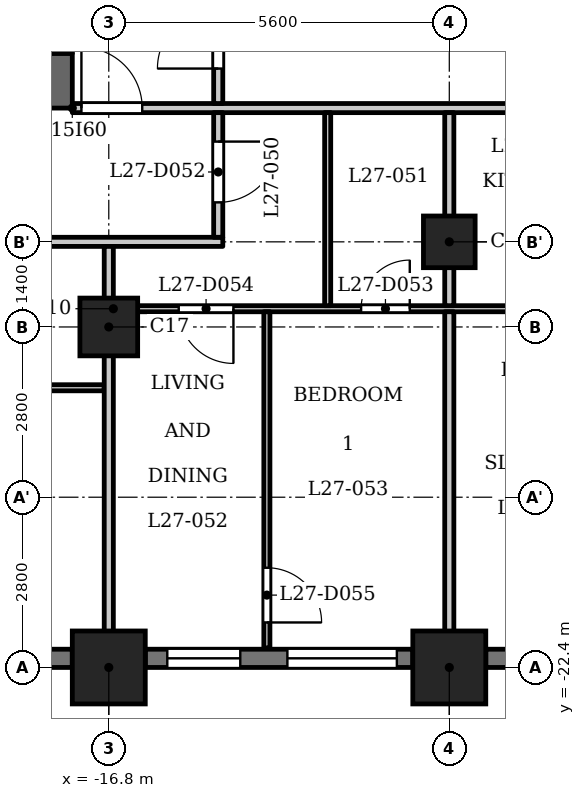
"""IFC4 building model, lengths in metres.
Left out: names, types, materials, properties, quantities, classifications, styles, units other than length and angle.
Written with IfcOpenShell. Run it as: python <this file> out.ifc"""

import sys

from ifc_helpers import new_model, si_unit, direction, frame, frame_2d, origin, origin_2d, place, context, subcontext, project, spatial, rectangle, extrude, element, fill, save


model = new_model("IFC4")
c1 = context("Model", 3, precision=1e-05, world=origin(), true_north=direction((0.0, 1.0)))
c2 = subcontext(c1, "Body", "Model", "MODEL_VIEW")
j1 = project(units=[si_unit("LENGTHUNIT", "METRE"), si_unit("PLANEANGLEUNIT", "RADIAN")], contexts=[c1])
p1 = place(None, origin())
s1 = spatial("IfcSite", under=j1, at=p1, CompositionType="ELEMENT")
p2 = place(p1, origin())
s2 = spatial("IfcBuilding", under=s1, at=p2, CompositionType="ELEMENT")
p3 = place(p2, frame((0.0, 0.0, 107.8)))
s3 = spatial("IfcBuildingStorey", under=s2, at=p3, CompositionType="ELEMENT", Elevation=107.8)
for number, where, z_axis, x_axis in (
    (1, (-16.8, -22.4, 0.0), (0.0, 0.0, 1.0), (1.0, 0.0, 0.0)),
    (2, (-11.2, -22.4, 0.0), (0.0, 0.0, 1.0), (1.0, 0.0, 0.0)),
):
    element("IfcColumn", number, at=place(p3, frame(where, z_axis=z_axis, x_axis=x_axis)), inside=s3, PredefinedType="COLUMN", context=c2, shape_type="SweptSolid", body=[
        extrude(rectangle(XDim=1.2, YDim=1.2, at=origin_2d()), origin(), (0.0, 0.0, 1.0), 3.5),
    ])
p4 = place(p3, frame((-16.8, -16.8, 0.0), z_axis=(0.0, 0.0, 1.0), x_axis=(1.0, 0.0, 0.0)))
e3 = element("IfcColumn", 3, at=p4, inside=s3, PredefinedType="COLUMN", context=c2, shape_type="SweptSolid", body=[
    extrude(rectangle(XDim=0.95, YDim=0.95, at=origin_2d()), origin(), (0.0, 0.0, 1.0), 3.5),
])
p5 = place(p3, frame((-11.2, -15.4, 0.0), z_axis=(0.0, 0.0, 1.0), x_axis=(1.0, 0.0, 0.0)))
e4 = element("IfcColumn", 4, at=p5, inside=s3, PredefinedType="COLUMN", context=c2, shape_type="SweptSolid", body=[
    extrude(rectangle(XDim=0.85, YDim=0.85, at=origin_2d()), origin(), (0.0, 0.0, 1.0), 3.5),
])
p6 = place(p3, frame((-20.0, -22.25, 0.0), z_axis=(0.0, 0.0, 1.0), x_axis=(1.0, 0.0, 0.0)))
e5 = element("IfcWall", 5, at=p6, inside=s3, PredefinedType="SOLIDWALL", context=c2, shape_type="SweptSolid", body=[
    extrude(rectangle(XDim=2.6, YDim=0.3, at=frame_2d((1.3, 0.0))), origin(), (0.0, 0.0, 1.0), 2.4),
])
p7 = place(p6, frame((0.7, 0.0, 0.6)))
e6 = element("IfcOpeningElement", 6, at=p7, cuts=e5, PredefinedType="OPENING", context=c2, shape_type="SweptSolid", body=[
    extrude(rectangle(XDim=1.2, YDim=1.55, at=frame_2d((0.6, 0.775))), frame((0.0, 0.16, 0.0), z_axis=(0.0, -1.0, 0.0), x_axis=(1.0, 0.0, 0.0)), (0.0, 0.0, 1.0), 0.32),
])
p8 = place(p3, frame((-16.2, -22.25, 0.0), z_axis=(0.0, 0.0, 1.0), x_axis=(1.0, 0.0, 0.0)))
e7 = element("IfcWall", 7, at=p8, inside=s3, PredefinedType="SOLIDWALL", context=c2, shape_type="SweptSolid", body=[
    extrude(rectangle(XDim=4.4, YDim=0.3, at=frame_2d((2.2, 0.0))), origin(), (0.0, 0.0, 1.0), 2.4),
])
p9 = place(p8, frame((0.363, 0.0, 0.6)))
e8 = element("IfcOpeningElement", 8, at=p9, cuts=e7, PredefinedType="OPENING", context=c2, shape_type="SweptSolid", body=[
    extrude(rectangle(XDim=1.2, YDim=1.55, at=frame_2d((0.6, 0.775))), frame((0.0, 0.16, 0.0), z_axis=(0.0, -1.0, 0.0), x_axis=(1.0, 0.0, 0.0)), (0.0, 0.0, 1.0), 0.32),
])
p10 = place(p8, frame((2.337, 0.0, 0.9)))
e9 = element("IfcOpeningElement", 9, at=p10, cuts=e7, PredefinedType="OPENING", context=c2, shape_type="SweptSolid", body=[
    extrude(rectangle(XDim=1.8, YDim=1.25, at=frame_2d((0.9, 0.625))), frame((0.0, 0.16, 0.0), z_axis=(0.0, -1.0, 0.0), x_axis=(1.0, 0.0, 0.0)), (0.0, 0.0, 1.0), 0.32),
])
p11 = place(p3, frame((-10.6, -22.25, 0.0), z_axis=(0.0, 0.0, 1.0), x_axis=(1.0, 0.0, 0.0)))
e10 = element("IfcWall", 10, at=p11, inside=s3, PredefinedType="SOLIDWALL", context=c2, shape_type="SweptSolid", body=[
    extrude(rectangle(XDim=4.4, YDim=0.3, at=frame_2d((2.2, 0.0))), origin(), (0.0, 0.0, 1.0), 2.4),
])
p12 = place(p11, frame((0.4, 0.0, 1.2)))
e11 = element("IfcOpeningElement", 11, at=p12, cuts=e10, PredefinedType="OPENING", context=c2, shape_type="SweptSolid", body=[
    extrude(rectangle(XDim=3.6, YDim=0.95, at=frame_2d((1.8, 0.475))), frame((0.0, 0.16, 0.0), z_axis=(0.0, -1.0, 0.0), x_axis=(1.0, 0.0, 0.0)), (0.0, 0.0, 1.0), 0.32),
])
p13 = place(p3, frame((-17.4, -12.75, 0.0), z_axis=(0.0, 0.0, 1.0), x_axis=(-1.0, 0.0, 0.0)))
e12 = element("IfcWall", 12, at=p13, inside=s3, PredefinedType="SHEAR", context=c2, shape_type="SweptSolid", body=[
    extrude(rectangle(XDim=10.4, YDim=0.9, at=frame_2d((5.2, 0.0))), origin(), (0.0, 0.0, 1.0), 3.2),
])
p14 = place(p3, frame((-17.6, -12.3, 0.0), z_axis=(0.0, 0.0, 1.0), x_axis=(0.0, 1.0, 0.0)))
e13 = element("IfcWall", 13, at=p14, inside=s3, PredefinedType="SHEAR", context=c2, shape_type="SweptSolid", body=[
    extrude(rectangle(XDim=24.6, YDim=0.4, at=frame_2d((12.3, 0.0))), origin(), (0.0, 0.0, 1.0), 3.2),
])
p15 = place(p14, frame((6.0, 0.0, 0.0)))
e14 = element("IfcOpeningElement", 14, at=p15, cuts=e13, PredefinedType="OPENING", context=c2, shape_type="SweptSolid", body=[
    extrude(rectangle(XDim=1.1, YDim=2.1, at=frame_2d((0.55, 1.05))), frame((0.0, 0.21, 0.0), z_axis=(0.0, -1.0, 0.0), x_axis=(1.0, 0.0, 0.0)), (0.0, 0.0, 1.0), 0.42),
])
p16 = place(p14, frame((8.4, 0.0, 0.0)))
e15 = element("IfcOpeningElement", 15, at=p16, cuts=e13, PredefinedType="OPENING", context=c2, shape_type="SweptSolid", body=[
    extrude(rectangle(XDim=1.1, YDim=2.1, at=frame_2d((0.55, 1.05))), frame((0.0, 0.21, 0.0), z_axis=(0.0, -1.0, 0.0), x_axis=(1.0, 0.0, 0.0)), (0.0, 0.0, 1.0), 0.42),
])
p17 = place(p14, frame((10.8, 0.0, 0.0)))
e16 = element("IfcOpeningElement", 16, at=p17, cuts=e13, PredefinedType="OPENING", context=c2, shape_type="SweptSolid", body=[
    extrude(rectangle(XDim=1.1, YDim=2.1, at=frame_2d((0.55, 1.05))), frame((0.0, 0.21, 0.0), z_axis=(0.0, -1.0, 0.0), x_axis=(1.0, 0.0, 0.0)), (0.0, 0.0, 1.0), 0.42),
])
p18 = place(p14, frame((16.75, 0.0, 0.0)))
e17 = element("IfcOpeningElement", 17, at=p18, cuts=e13, PredefinedType="OPENING", context=c2, shape_type="SweptSolid", body=[
    extrude(rectangle(XDim=0.9, YDim=2.1, at=frame_2d((0.45, 1.05))), frame((0.0, 0.21, 0.0), z_axis=(0.0, -1.0, 0.0), x_axis=(1.0, 0.0, 0.0)), (0.0, 0.0, 1.0), 0.42),
])
p19 = place(p14, frame((22.8, 0.0, 0.0)))
e18 = element("IfcOpeningElement", 18, at=p19, cuts=e13, PredefinedType="OPENING", context=c2, shape_type="SweptSolid", body=[
    extrude(rectangle(XDim=1.1, YDim=2.1, at=frame_2d((0.55, 1.05))), frame((0.0, 0.21, 0.0), z_axis=(0.0, -1.0, 0.0), x_axis=(1.0, 0.0, 0.0)), (0.0, 0.0, 1.0), 0.42),
])
p20 = place(p14, frame((0.7, 0.0, 0.0)))
e19 = element("IfcOpeningElement", 19, at=p20, cuts=e13, PredefinedType="OPENING", context=c2, shape_type="SweptSolid", body=[
    extrude(rectangle(XDim=1.1, YDim=2.1, at=frame_2d((0.55, 1.05))), frame((0.0, 0.21, 0.0), z_axis=(0.0, -1.0, 0.0), x_axis=(1.0, 0.0, 0.0)), (0.0, 0.0, 1.0), 0.42),
])
p21 = place(p14, frame((12.775, 0.0, 0.0)))
e20 = element("IfcOpeningElement", 20, at=p21, cuts=e13, PredefinedType="OPENING", context=c2, shape_type="SweptSolid", body=[
    extrude(rectangle(XDim=1.8, YDim=2.1, at=frame_2d((0.9, 1.05))), frame((0.0, 0.21, 0.0), z_axis=(0.0, -1.0, 0.0), x_axis=(1.0, 0.0, 0.0)), (0.0, 0.0, 1.0), 0.42),
])
p22 = place(p3, frame((-26.394, -17.8, 0.0), z_axis=(0.0, 0.0, 1.0), x_axis=(1.0, 0.0, 0.0)))
e21 = element("IfcWall", 21, at=p22, inside=s3, PredefinedType="PARTITIONING", context=c2, shape_type="SweptSolid", body=[
    extrude(rectangle(XDim=9.519, YDim=0.1, at=frame_2d((4.76, 0.0))), origin(), (0.0, 0.0, 1.0), 3.2),
])
p23 = place(p22, frame((0.794, 0.0, 0.0)))
e22 = element("IfcOpeningElement", 22, at=p23, cuts=e21, PredefinedType="OPENING", context=c2, shape_type="SweptSolid", body=[
    extrude(rectangle(XDim=0.8, YDim=2.1, at=frame_2d((0.4, 1.05))), frame((0.0, 0.06, 0.0), z_axis=(0.0, -1.0, 0.0), x_axis=(1.0, 0.0, 0.0)), (0.0, 0.0, 1.0), 0.12),
])
p24 = place(p22, frame((5.644, 0.0, 0.0)))
e23 = element("IfcOpeningElement", 23, at=p24, cuts=e21, PredefinedType="OPENING", context=c2, shape_type="SweptSolid", body=[
    extrude(rectangle(XDim=0.9, YDim=2.1, at=frame_2d((0.45, 1.05))), frame((0.0, 0.06, 0.0), z_axis=(0.0, -1.0, 0.0), x_axis=(1.0, 0.0, 0.0)), (0.0, 0.0, 1.0), 0.12),
])
p25 = place(p3, frame((-16.725, -16.5, 0.0), z_axis=(0.0, 0.0, 1.0), x_axis=(1.0, 0.0, 0.0)))
e24 = element("IfcWall", 24, at=p25, inside=s3, PredefinedType="PARTITIONING", context=c2, shape_type="SweptSolid", body=[
    extrude(rectangle(XDim=33.45, YDim=0.1, at=frame_2d((16.725, 0.0))), origin(), (0.0, 0.0, 1.0), 3.2),
])
p26 = place(p25, frame((4.075, 0.0, 0.0)))
e25 = element("IfcOpeningElement", 25, at=p26, cuts=e24, PredefinedType="OPENING", context=c2, shape_type="SweptSolid", body=[
    extrude(rectangle(XDim=0.8, YDim=2.1, at=frame_2d((0.4, 1.05))), frame((0.0, 0.06, 0.0), z_axis=(0.0, -1.0, 0.0), x_axis=(1.0, 0.0, 0.0)), (0.0, 0.0, 1.0), 0.12),
])
p27 = place(p25, frame((1.075, 0.0, 0.0)))
e26 = element("IfcOpeningElement", 26, at=p27, cuts=e24, PredefinedType="OPENING", context=c2, shape_type="SweptSolid", body=[
    extrude(rectangle(XDim=0.9, YDim=2.1, at=frame_2d((0.45, 1.05))), frame((0.0, 0.06, 0.0), z_axis=(0.0, -1.0, 0.0), x_axis=(1.0, 0.0, 0.0)), (0.0, 0.0, 1.0), 0.12),
])
p28 = place(p25, frame((9.675, 0.0, 0.0)))
e27 = element("IfcOpeningElement", 27, at=p28, cuts=e24, PredefinedType="OPENING", context=c2, shape_type="SweptSolid", body=[
    extrude(rectangle(XDim=0.8, YDim=2.1, at=frame_2d((0.4, 1.05))), frame((0.0, 0.06, 0.0), z_axis=(0.0, -1.0, 0.0), x_axis=(1.0, 0.0, 0.0)), (0.0, 0.0, 1.0), 0.12),
])
p29 = place(p25, frame((7.675, 0.0, 0.0)))
e28 = element("IfcOpeningElement", 28, at=p29, cuts=e24, PredefinedType="OPENING", context=c2, shape_type="SweptSolid", body=[
    extrude(rectangle(XDim=0.9, YDim=2.1, at=frame_2d((0.45, 1.05))), frame((0.0, 0.06, 0.0), z_axis=(0.0, -1.0, 0.0), x_axis=(1.0, 0.0, 0.0)), (0.0, 0.0, 1.0), 0.12),
])
p30 = place(p25, frame((15.275, 0.0, 0.0)))
e29 = element("IfcOpeningElement", 29, at=p30, cuts=e24, PredefinedType="OPENING", context=c2, shape_type="SweptSolid", body=[
    extrude(rectangle(XDim=0.8, YDim=2.1, at=frame_2d((0.4, 1.05))), frame((0.0, 0.06, 0.0), z_axis=(0.0, -1.0, 0.0), x_axis=(1.0, 0.0, 0.0)), (0.0, 0.0, 1.0), 0.12),
])
p31 = place(p25, frame((11.775, 0.0, 0.0)))
e30 = element("IfcOpeningElement", 30, at=p31, cuts=e24, PredefinedType="OPENING", context=c2, shape_type="SweptSolid", body=[
    extrude(rectangle(XDim=0.9, YDim=2.1, at=frame_2d((0.45, 1.05))), frame((0.0, 0.06, 0.0), z_axis=(0.0, -1.0, 0.0), x_axis=(1.0, 0.0, 0.0)), (0.0, 0.0, 1.0), 0.12),
])
p32 = place(p25, frame((20.625, 0.0, 0.0)))
e31 = element("IfcOpeningElement", 31, at=p32, cuts=e24, PredefinedType="OPENING", context=c2, shape_type="SweptSolid", body=[
    extrude(rectangle(XDim=0.8, YDim=2.1, at=frame_2d((0.4, 1.05))), frame((0.0, 0.06, 0.0), z_axis=(0.0, -1.0, 0.0), x_axis=(1.0, 0.0, 0.0)), (0.0, 0.0, 1.0), 0.12),
])
p33 = place(p25, frame((18.375, 0.0, 0.0)))
e32 = element("IfcOpeningElement", 32, at=p33, cuts=e24, PredefinedType="OPENING", context=c2, shape_type="SweptSolid", body=[
    extrude(rectangle(XDim=0.9, YDim=2.1, at=frame_2d((0.45, 1.05))), frame((0.0, 0.06, 0.0), z_axis=(0.0, -1.0, 0.0), x_axis=(1.0, 0.0, 0.0)), (0.0, 0.0, 1.0), 0.12),
])
p34 = place(p25, frame((26.475, 0.0, 0.0)))
e33 = element("IfcOpeningElement", 33, at=p34, cuts=e24, PredefinedType="OPENING", context=c2, shape_type="SweptSolid", body=[
    extrude(rectangle(XDim=0.8, YDim=2.1, at=frame_2d((0.4, 1.05))), frame((0.0, 0.06, 0.0), z_axis=(0.0, -1.0, 0.0), x_axis=(1.0, 0.0, 0.0)), (0.0, 0.0, 1.0), 0.12),
])
p35 = place(p25, frame((23.225, 0.0, 0.0)))
e34 = element("IfcOpeningElement", 34, at=p35, cuts=e24, PredefinedType="OPENING", context=c2, shape_type="SweptSolid", body=[
    extrude(rectangle(XDim=0.9, YDim=2.1, at=frame_2d((0.45, 1.05))), frame((0.0, 0.06, 0.0), z_axis=(0.0, -1.0, 0.0), x_axis=(1.0, 0.0, 0.0)), (0.0, 0.0, 1.0), 0.12),
])
p36 = place(p25, frame((29.475, 0.0, 0.0)))
e35 = element("IfcOpeningElement", 35, at=p36, cuts=e24, PredefinedType="OPENING", context=c2, shape_type="SweptSolid", body=[
    extrude(rectangle(XDim=0.8, YDim=2.1, at=frame_2d((0.4, 1.05))), frame((0.0, 0.06, 0.0), z_axis=(0.0, -1.0, 0.0), x_axis=(1.0, 0.0, 0.0)), (0.0, 0.0, 1.0), 0.12),
])
p37 = place(p25, frame((31.825, 0.0, 0.0)))
e36 = element("IfcOpeningElement", 36, at=p37, cuts=e24, PredefinedType="OPENING", context=c2, shape_type="SweptSolid", body=[
    extrude(rectangle(XDim=0.9, YDim=2.1, at=frame_2d((0.45, 1.05))), frame((0.0, 0.06, 0.0), z_axis=(0.0, -1.0, 0.0), x_axis=(1.0, 0.0, 0.0)), (0.0, 0.0, 1.0), 0.12),
])
p38 = place(p3, frame((-27.484, -15.4, 0.0), z_axis=(0.0, 0.0, 1.0), x_axis=(1.0, 0.0, 0.0)))
e37 = element("IfcWall", 37, at=p38, inside=s3, PredefinedType="PARTITIONING", context=c2, shape_type="SweptSolid", body=[
    extrude(rectangle(XDim=12.559, YDim=0.15, at=frame_2d((6.279, 0.0))), origin(), (0.0, 0.0, 1.0), 3.2),
])
p39 = place(p38, frame((5.734, 0.0, 0.0)))
e38 = element("IfcOpeningElement", 38, at=p39, cuts=e37, PredefinedType="OPENING", context=c2, shape_type="SweptSolid", body=[
    extrude(rectangle(XDim=1.0, YDim=2.1, at=frame_2d((0.5, 1.05))), frame((0.0, 0.085, 0.0), z_axis=(0.0, -1.0, 0.0), x_axis=(1.0, 0.0, 0.0)), (0.0, 0.0, 1.0), 0.17),
])
p40 = place(p3, frame((-17.4, -13.2, 0.0), z_axis=(0.0, 0.0, 1.0), x_axis=(1.0, 0.0, 0.0)))
e39 = element("IfcWall", 39, at=p40, inside=s3, PredefinedType="PARTITIONING", context=c2, shape_type="SweptSolid", body=[
    extrude(rectangle(XDim=34.8, YDim=0.15, at=frame_2d((17.4, 0.0))), origin(), (0.0, 0.0, 1.0), 3.2),
])
p41 = place(p40, frame((0.15, 0.0, 0.0)))
e40 = element("IfcOpeningElement", 40, at=p41, cuts=e39, PredefinedType="OPENING", context=c2, shape_type="SweptSolid", body=[
    extrude(rectangle(XDim=1.0, YDim=2.1, at=frame_2d((0.5, 1.05))), frame((0.0, 0.085, 0.0), z_axis=(0.0, -1.0, 0.0), x_axis=(1.0, 0.0, 0.0)), (0.0, 0.0, 1.0), 0.17),
])
p42 = place(p40, frame((33.55, 0.0, 0.0)))
e41 = element("IfcOpeningElement", 41, at=p42, cuts=e39, PredefinedType="OPENING", context=c2, shape_type="SweptSolid", body=[
    extrude(rectangle(XDim=1.0, YDim=2.1, at=frame_2d((0.5, 1.05))), frame((0.0, 0.085, 0.0), z_axis=(0.0, -1.0, 0.0), x_axis=(1.0, 0.0, 0.0)), (0.0, 0.0, 1.0), 0.17),
])
p43 = place(p40, frame((8.1, 0.0, 0.0)))
e42 = element("IfcOpeningElement", 42, at=p43, cuts=e39, PredefinedType="OPENING", context=c2, shape_type="SweptSolid", body=[
    extrude(rectangle(XDim=1.0, YDim=2.1, at=frame_2d((0.5, 1.05))), frame((0.0, 0.085, 0.0), z_axis=(0.0, -1.0, 0.0), x_axis=(1.0, 0.0, 0.0)), (0.0, 0.0, 1.0), 0.17),
])
p44 = place(p40, frame((12.45, 0.0, 0.0)))
e43 = element("IfcOpeningElement", 43, at=p44, cuts=e39, PredefinedType="OPENING", context=c2, shape_type="SweptSolid", body=[
    extrude(rectangle(XDim=1.0, YDim=2.1, at=frame_2d((0.5, 1.05))), frame((0.0, 0.085, 0.0), z_axis=(0.0, -1.0, 0.0), x_axis=(1.0, 0.0, 0.0)), (0.0, 0.0, 1.0), 0.17),
])
p45 = place(p40, frame((19.05, 0.0, 0.0)))
e44 = element("IfcOpeningElement", 44, at=p45, cuts=e39, PredefinedType="OPENING", context=c2, shape_type="SweptSolid", body=[
    extrude(rectangle(XDim=1.0, YDim=2.1, at=frame_2d((0.5, 1.05))), frame((0.0, 0.085, 0.0), z_axis=(0.0, -1.0, 0.0), x_axis=(1.0, 0.0, 0.0)), (0.0, 0.0, 1.0), 0.17),
])
p46 = place(p40, frame((24.9, 0.0, 0.0)))
e45 = element("IfcOpeningElement", 45, at=p46, cuts=e39, PredefinedType="OPENING", context=c2, shape_type="SweptSolid", body=[
    extrude(rectangle(XDim=1.0, YDim=2.1, at=frame_2d((0.5, 1.05))), frame((0.0, 0.085, 0.0), z_axis=(0.0, -1.0, 0.0), x_axis=(1.0, 0.0, 0.0)), (0.0, 0.0, 1.0), 0.17),
])
p47 = place(p3, frame((-16.8, -22.98, 0.0), z_axis=(0.0, 0.0, 1.0), x_axis=(0.0, 1.0, 0.0)))
e46 = element("IfcWall", 46, at=p47, inside=s3, PredefinedType="PARTITIONING", context=c2, shape_type="SweptSolid", body=[
    extrude(rectangle(XDim=7.505, YDim=0.15, at=frame_2d((3.752, 0.0))), origin(), (0.0, 0.0, 1.0), 3.2),
])
p48 = place(p3, frame((-15.0, -15.325, 0.0), z_axis=(0.0, 0.0, 1.0), x_axis=(0.0, 1.0, 0.0)))
e47 = element("IfcWall", 47, at=p48, inside=s3, PredefinedType="PARTITIONING", context=c2, shape_type="SweptSolid", body=[
    extrude(rectangle(XDim=2.05, YDim=0.15, at=frame_2d((1.025, 0.0))), origin(), (0.0, 0.0, 1.0), 3.2),
])
p49 = place(p48, frame((0.574, 0.0, 0.0)))
e48 = element("IfcOpeningElement", 48, at=p49, cuts=e47, PredefinedType="OPENING", context=c2, shape_type="SweptSolid", body=[
    extrude(rectangle(XDim=1.0, YDim=2.1, at=frame_2d((0.5, 1.05))), frame((0.0, 0.085, 0.0), z_axis=(0.0, -1.0, 0.0), x_axis=(1.0, 0.0, 0.0)), (0.0, 0.0, 1.0), 0.17),
])
p50 = place(p3, frame((-15.0, -13.125, 0.0), z_axis=(0.0, 0.0, 1.0), x_axis=(0.0, 1.0, 0.0)))
e49 = element("IfcWall", 49, at=p50, inside=s3, PredefinedType="PARTITIONING", context=c2, shape_type="SweptSolid", body=[
    extrude(rectangle(XDim=6.356, YDim=0.15, at=frame_2d((3.178, 0.0))), origin(), (0.0, 0.0, 1.0), 3.2),
])
p51 = place(p50, frame((0.575, 0.0, 0.0)))
e50 = element("IfcOpeningElement", 50, at=p51, cuts=e49, PredefinedType="OPENING", context=c2, shape_type="SweptSolid", body=[
    extrude(rectangle(XDim=1.0, YDim=2.1, at=frame_2d((0.5, 1.05))), frame((0.0, 0.085, 0.0), z_axis=(0.0, -1.0, 0.0), x_axis=(1.0, 0.0, 0.0)), (0.0, 0.0, 1.0), 0.17),
])
p52 = place(p3, frame((-14.2, -22.08, 0.0), z_axis=(0.0, 0.0, 1.0), x_axis=(0.0, 1.0, 0.0)))
e51 = element("IfcWall", 51, at=p52, inside=s3, PredefinedType="PARTITIONING", context=c2, shape_type="SweptSolid", body=[
    extrude(rectangle(XDim=5.53, YDim=0.1, at=frame_2d((2.765, 0.0))), origin(), (0.0, 0.0, 1.0), 3.2),
])
p53 = place(p52, frame((0.42, 0.0, 0.0)))
e52 = element("IfcOpeningElement", 52, at=p53, cuts=e51, PredefinedType="OPENING", context=c2, shape_type="SweptSolid", body=[
    extrude(rectangle(XDim=0.9, YDim=2.1, at=frame_2d((0.45, 1.05))), frame((0.0, 0.06, 0.0), z_axis=(0.0, -1.0, 0.0), x_axis=(1.0, 0.0, 0.0)), (0.0, 0.0, 1.0), 0.12),
])
p54 = place(p3, frame((-13.2, -16.45, 0.0), z_axis=(0.0, 0.0, 1.0), x_axis=(0.0, 1.0, 0.0)))
e53 = element("IfcWall", 53, at=p54, inside=s3, PredefinedType="PARTITIONING", context=c2, shape_type="SweptSolid", body=[
    extrude(rectangle(XDim=3.175, YDim=0.1, at=frame_2d((1.587, 0.0))), origin(), (0.0, 0.0, 1.0), 3.2),
])
p55 = place(p3, frame((-11.2, -22.98, 0.0), z_axis=(0.0, 0.0, 1.0), x_axis=(0.0, 1.0, 0.0)))
e54 = element("IfcWall", 54, at=p55, inside=s3, PredefinedType="PARTITIONING", context=c2, shape_type="SweptSolid", body=[
    extrude(rectangle(XDim=6.43, YDim=0.15, at=frame_2d((3.215, 0.0))), origin(), (0.0, 0.0, 1.0), 3.2),
])
p56 = place(p3, frame((-11.2, -16.45, 0.0), z_axis=(0.0, 0.0, 1.0), x_axis=(0.0, 1.0, 0.0)))
e55 = element("IfcWall", 55, at=p56, inside=s3, PredefinedType="PARTITIONING", context=c2, shape_type="SweptSolid", body=[
    extrude(rectangle(XDim=3.175, YDim=0.15, at=frame_2d((1.587, 0.0))), origin(), (0.0, 0.0, 1.0), 3.2),
])
p57 = place(p51, origin())
e56 = element("IfcDoor", 56, at=p57, inside=s3, OperationType="SINGLE_SWING_RIGHT", PredefinedType="DOOR", context=c2, shape_type="SweptSolid", body=[
    extrude(rectangle(XDim=1.0, YDim=2.1, at=frame_2d((0.5, 1.05))), frame((0.0, 0.025, 0.0), z_axis=(0.0, -1.0, 0.0), x_axis=(1.0, 0.0, 0.0)), (0.0, 0.0, 1.0), 0.05),
])
fill(e50, e56)
p58 = place(p41, origin())
e57 = element("IfcDoor", 57, at=p58, inside=s3, OperationType="SINGLE_SWING_RIGHT", PredefinedType="DOOR", context=c2, shape_type="SweptSolid", body=[
    extrude(rectangle(XDim=1.0, YDim=2.1, at=frame_2d((0.5, 1.05))), frame((0.0, 0.025, 0.0), z_axis=(0.0, -1.0, 0.0), x_axis=(1.0, 0.0, 0.0)), (0.0, 0.0, 1.0), 0.05),
])
fill(e40, e57)
p59 = place(p49, origin())
e58 = element("IfcDoor", 58, at=p59, inside=s3, OperationType="SINGLE_SWING_RIGHT", PredefinedType="DOOR", context=c2, shape_type="SweptSolid", body=[
    extrude(rectangle(XDim=1.0, YDim=2.1, at=frame_2d((0.5, 1.05))), frame((0.0, 0.025, 0.0), z_axis=(0.0, -1.0, 0.0), x_axis=(1.0, 0.0, 0.0)), (0.0, 0.0, 1.0), 0.05),
])
fill(e48, e58)
p60 = place(p26, origin())
e59 = element("IfcDoor", 59, at=p60, inside=s3, OperationType="SINGLE_SWING_LEFT", PredefinedType="DOOR", context=c2, shape_type="SweptSolid", body=[
    extrude(rectangle(XDim=0.8, YDim=2.1, at=frame_2d((0.4, 1.05))), frame((0.0, 0.025, 0.0), z_axis=(0.0, -1.0, 0.0), x_axis=(1.0, 0.0, 0.0)), (0.0, 0.0, 1.0), 0.05),
])
fill(e25, e59)
p61 = place(p27, origin())
e60 = element("IfcDoor", 60, at=p61, inside=s3, OperationType="SINGLE_SWING_RIGHT", PredefinedType="DOOR", context=c2, shape_type="SweptSolid", body=[
    extrude(rectangle(XDim=0.9, YDim=2.1, at=frame_2d((0.45, 1.05))), frame((0.0, 0.025, 0.0), z_axis=(0.0, -1.0, 0.0), x_axis=(1.0, 0.0, 0.0)), (0.0, 0.0, 1.0), 0.05),
])
fill(e26, e60)
p62 = place(p53, origin())
e61 = element("IfcDoor", 61, at=p62, inside=s3, OperationType="SINGLE_SWING_LEFT", PredefinedType="DOOR", context=c2, shape_type="SweptSolid", body=[
    extrude(rectangle(XDim=0.9, YDim=2.1, at=frame_2d((0.45, 1.05))), frame((0.0, 0.025, 0.0), z_axis=(0.0, -1.0, 0.0), x_axis=(1.0, 0.0, 0.0)), (0.0, 0.0, 1.0), 0.05),
])
fill(e52, e61)
p63 = place(p9, origin())
e62 = element("IfcWindow", 62, at=p63, inside=s3, PartitioningType="SINGLE_PANEL", PredefinedType="WINDOW", context=c2, shape_type="SweptSolid", body=[
    extrude(rectangle(XDim=1.2, YDim=1.55, at=frame_2d((0.6, 0.775))), frame((0.0, 0.03, 0.0), z_axis=(0.0, -1.0, 0.0), x_axis=(1.0, 0.0, 0.0)), (0.0, 0.0, 1.0), 0.06),
])
fill(e8, e62)
p64 = place(p10, origin())
e63 = element("IfcWindow", 63, at=p64, inside=s3, PartitioningType="SINGLE_PANEL", PredefinedType="WINDOW", context=c2, shape_type="SweptSolid", body=[
    extrude(rectangle(XDim=1.8, YDim=1.25, at=frame_2d((0.9, 0.625))), frame((0.0, 0.03, 0.0), z_axis=(0.0, -1.0, 0.0), x_axis=(1.0, 0.0, 0.0)), (0.0, 0.0, 1.0), 0.06),
])
fill(e9, e63)
save(model, sys.argv[1])
